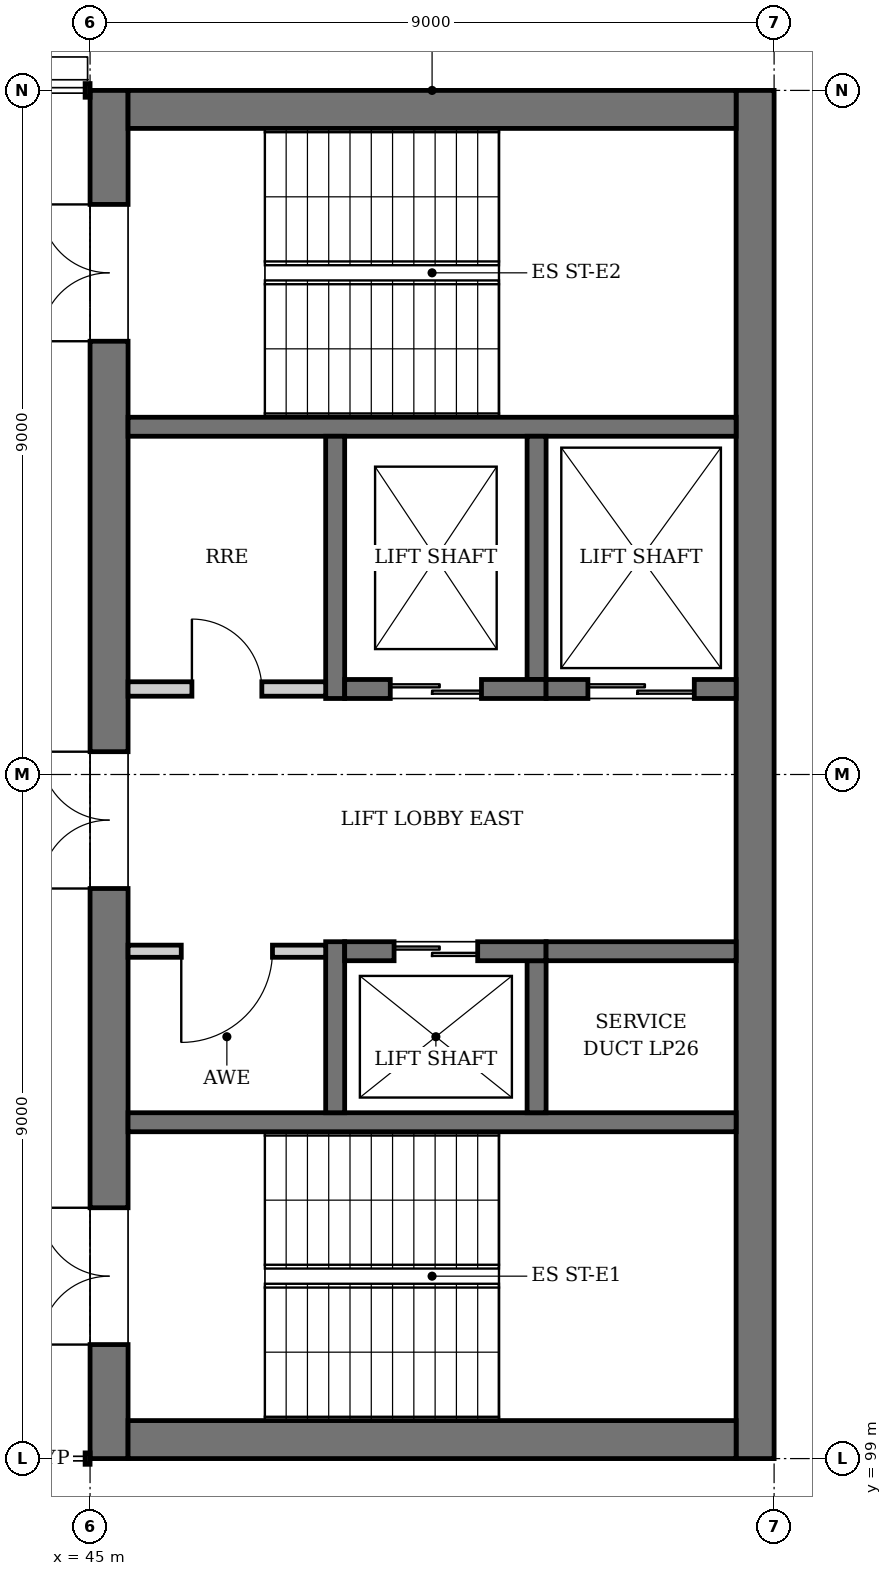
"""IFC4 building model, lengths in metres.
Left out: names, types, materials, properties, quantities, classifications, styles, units other than length and angle.
Written with IfcOpenShell. Run it as: python <this file> out.ifc"""

import sys

from ifc_helpers import new_model, si_unit, direction, frame, frame_2d, origin, place, context, subcontext, project, spatial, rectangle, extrude, element, fill, save


model = new_model("IFC4")
c1 = context("Model", 3, precision=1e-05, world=origin(), true_north=direction((0.0, 1.0)))
c2 = subcontext(c1, "Body", "Model", "MODEL_VIEW")
j1 = project(units=[si_unit("LENGTHUNIT", "METRE"), si_unit("PLANEANGLEUNIT", "RADIAN")], contexts=[c1])
p1 = place(None, origin())
s1 = spatial("IfcSite", under=j1, at=p1, CompositionType="ELEMENT")
p2 = place(p1, origin())
s2 = spatial("IfcBuilding", under=s1, at=p2, CompositionType="ELEMENT")
p3 = place(p2, frame((0.0, 0.0, 55.2)))
s3 = spatial("IfcBuildingStorey", under=s2, at=p3, CompositionType="ELEMENT", Elevation=55.2)
p4 = place(p3, frame((45.25, 99.0, 0.0), z_axis=(0.0, 0.0, 1.0), x_axis=(0.0, 1.0, 0.0)))
e1 = element("IfcWall", 1, at=p4, inside=s3, PredefinedType="SHEAR", context=c2, shape_type="SweptSolid", body=[
    extrude(rectangle(XDim=18.0, YDim=0.5, at=frame_2d((9.0, 0.0))), origin(), (0.0, 0.0, 1.0), 4.0),
])
p5 = place(p4, frame((1.5, 0.0, 0.0)))
e2 = element("IfcOpeningElement", 2, at=p5, cuts=e1, PredefinedType="OPENING", context=c2, shape_type="SweptSolid", body=[
    extrude(rectangle(XDim=1.8, YDim=2.1, at=frame_2d((0.9, 1.05))), frame((0.0, 0.26, 0.0), z_axis=(0.0, -1.0, 0.0), x_axis=(1.0, 0.0, 0.0)), (0.0, 0.0, 1.0), 0.52),
])
p6 = place(p4, frame((14.7, 0.0, 0.0)))
e3 = element("IfcOpeningElement", 3, at=p6, cuts=e1, PredefinedType="OPENING", context=c2, shape_type="SweptSolid", body=[
    extrude(rectangle(XDim=1.8, YDim=2.1, at=frame_2d((0.9, 1.05))), frame((0.0, 0.26, 0.0), z_axis=(0.0, -1.0, 0.0), x_axis=(1.0, 0.0, 0.0)), (0.0, 0.0, 1.0), 0.52),
])
p7 = place(p4, frame((7.5, 0.0, 0.0)))
e4 = element("IfcOpeningElement", 4, at=p7, cuts=e1, PredefinedType="OPENING", context=c2, shape_type="SweptSolid", body=[
    extrude(rectangle(XDim=1.8, YDim=2.1, at=frame_2d((0.9, 1.05))), frame((0.0, 0.26, 0.0), z_axis=(0.0, -1.0, 0.0), x_axis=(1.0, 0.0, 0.0)), (0.0, 0.0, 1.0), 0.52),
])
p8 = place(p3, frame((53.75, 99.0, 0.0), z_axis=(0.0, 0.0, 1.0), x_axis=(0.0, 1.0, 0.0)))
e5 = element("IfcWall", 5, at=p8, inside=s3, PredefinedType="SHEAR", context=c2, shape_type="SweptSolid", body=[
    extrude(rectangle(XDim=18.0, YDim=0.5, at=frame_2d((9.0, 0.0))), origin(), (0.0, 0.0, 1.0), 4.0),
])
for number, where, z_axis, x_axis in (
    (6, (45.5, 99.25, 0.0), (0.0, 0.0, 1.0), (1.0, 0.0, 0.0)),
    (7, (45.5, 116.75, 0.0), (0.0, 0.0, 1.0), (1.0, 0.0, 0.0)),
):
    element("IfcWall", number, at=place(p3, frame(where, z_axis=z_axis, x_axis=x_axis)), inside=s3, PredefinedType="SHEAR", context=c2, shape_type="SweptSolid", body=[
        extrude(rectangle(XDim=8.0, YDim=0.5, at=frame_2d((4.0, 0.0))), origin(), (0.0, 0.0, 1.0), 4.0),
    ])
for number, where, z_axis, x_axis in (
    (8, (45.5, 103.425, 0.0), (0.0, 0.0, 1.0), (1.0, 0.0, 0.0)),
    (9, (45.5, 112.575, 0.0), (0.0, 0.0, 1.0), (1.0, 0.0, 0.0)),
):
    element("IfcWall", number, at=place(p3, frame(where, z_axis=z_axis, x_axis=x_axis)), inside=s3, PredefinedType="SOLIDWALL", context=c2, shape_type="SweptSolid", body=[
        extrude(rectangle(XDim=8.0, YDim=0.25, at=frame_2d((4.0, 0.0))), origin(), (0.0, 0.0, 1.0), 3.75),
    ])
p9 = place(p3, frame((48.225, 103.55, 0.0), z_axis=(0.0, 0.0, 1.0), x_axis=(0.0, 1.0, 0.0)))
e10 = element("IfcWall", 10, at=p9, inside=s3, PredefinedType="SOLIDWALL", context=c2, shape_type="SweptSolid", body=[
    extrude(rectangle(XDim=2.25, YDim=0.25, at=frame_2d((1.125, 0.0))), origin(), (0.0, 0.0, 1.0), 4.0),
])
p10 = place(p3, frame((50.875, 103.55, 0.0), z_axis=(0.0, 0.0, 1.0), x_axis=(0.0, 1.0, 0.0)))
e11 = element("IfcWall", 11, at=p10, inside=s3, PredefinedType="SOLIDWALL", context=c2, shape_type="SweptSolid", body=[
    extrude(rectangle(XDim=2.0, YDim=0.25, at=frame_2d((1.0, 0.0))), origin(), (0.0, 0.0, 1.0), 4.0),
])
p11 = place(p3, frame((48.35, 105.675, 0.0), z_axis=(0.0, 0.0, 1.0), x_axis=(1.0, 0.0, 0.0)))
e12 = element("IfcWall", 12, at=p11, inside=s3, PredefinedType="SOLIDWALL", context=c2, shape_type="SweptSolid", body=[
    extrude(rectangle(XDim=2.65, YDim=0.25, at=frame_2d((1.325, 0.0))), origin(), (0.0, 0.0, 1.0), 4.0),
])
p12 = place(p11, frame((0.65, 0.0, 0.0)))
e13 = element("IfcOpeningElement", 13, at=p12, cuts=e12, PredefinedType="OPENING", context=c2, shape_type="SweptSolid", body=[
    extrude(rectangle(XDim=1.1, YDim=2.1, at=frame_2d((0.55, 1.05))), frame((0.0, 0.135, 0.0), z_axis=(0.0, -1.0, 0.0), x_axis=(1.0, 0.0, 0.0)), (0.0, 0.0, 1.0), 0.27),
])
p13 = place(p3, frame((51.0, 105.675, 0.0), z_axis=(0.0, 0.0, 1.0), x_axis=(1.0, 0.0, 0.0)))
e14 = element("IfcWall", 14, at=p13, inside=s3, PredefinedType="SOLIDWALL", context=c2, shape_type="SweptSolid", body=[
    extrude(rectangle(XDim=2.5, YDim=0.25, at=frame_2d((1.25, 0.0))), origin(), (0.0, 0.0, 1.0), 4.0),
])
p14 = place(p3, frame((48.225, 109.0, 0.0), z_axis=(0.0, 0.0, 1.0), x_axis=(0.0, 1.0, 0.0)))
e15 = element("IfcWall", 15, at=p14, inside=s3, PredefinedType="SOLIDWALL", context=c2, shape_type="SweptSolid", body=[
    extrude(rectangle(XDim=3.45, YDim=0.25, at=frame_2d((1.725, 0.0))), origin(), (0.0, 0.0, 1.0), 4.0),
])
p15 = place(p3, frame((50.875, 109.25, 0.0), z_axis=(0.0, 0.0, 1.0), x_axis=(0.0, 1.0, 0.0)))
e16 = element("IfcWall", 16, at=p15, inside=s3, PredefinedType="SOLIDWALL", context=c2, shape_type="SweptSolid", body=[
    extrude(rectangle(XDim=3.2, YDim=0.25, at=frame_2d((1.6, 0.0))), origin(), (0.0, 0.0, 1.0), 4.0),
])
p16 = place(p3, frame((48.35, 109.125, 0.0), z_axis=(0.0, 0.0, 1.0), x_axis=(1.0, 0.0, 0.0)))
e17 = element("IfcWall", 17, at=p16, inside=s3, PredefinedType="SOLIDWALL", context=c2, shape_type="SweptSolid", body=[
    extrude(rectangle(XDim=2.65, YDim=0.25, at=frame_2d((1.325, 0.0))), origin(), (0.0, 0.0, 1.0), 4.0),
])
p17 = place(p16, frame((0.6, 0.0, 0.0)))
e18 = element("IfcOpeningElement", 18, at=p17, cuts=e17, PredefinedType="OPENING", context=c2, shape_type="SweptSolid", body=[
    extrude(rectangle(XDim=1.2, YDim=2.1, at=frame_2d((0.6, 1.05))), frame((0.0, 0.135, 0.0), z_axis=(0.0, -1.0, 0.0), x_axis=(1.0, 0.0, 0.0)), (0.0, 0.0, 1.0), 0.27),
])
p18 = place(p3, frame((51.0, 109.125, 0.0), z_axis=(0.0, 0.0, 1.0), x_axis=(1.0, 0.0, 0.0)))
e19 = element("IfcWall", 19, at=p18, inside=s3, PredefinedType="SOLIDWALL", context=c2, shape_type="SweptSolid", body=[
    extrude(rectangle(XDim=2.5, YDim=0.25, at=frame_2d((1.25, 0.0))), origin(), (0.0, 0.0, 1.0), 4.0),
])
p19 = place(p18, frame((0.55, 0.0, 0.0)))
e20 = element("IfcOpeningElement", 20, at=p19, cuts=e19, PredefinedType="OPENING", context=c2, shape_type="SweptSolid", body=[
    extrude(rectangle(XDim=1.4, YDim=2.4, at=frame_2d((0.7, 1.2))), frame((0.0, 0.135, 0.0), z_axis=(0.0, -1.0, 0.0), x_axis=(1.0, 0.0, 0.0)), (0.0, 0.0, 1.0), 0.27),
])
p20 = place(p3, frame((45.5, 105.675, 0.0), z_axis=(0.0, 0.0, 1.0), x_axis=(1.0, 0.0, 0.0)))
e21 = element("IfcWall", 21, at=p20, inside=s3, PredefinedType="PARTITIONING", context=c2, shape_type="SweptSolid", body=[
    extrude(rectangle(XDim=2.6, YDim=0.16, at=frame_2d((1.3, 0.0))), origin(), (0.0, 0.0, 1.0), 3.75),
])
p21 = place(p20, frame((0.7, 0.0, 0.0)))
e22 = element("IfcOpeningElement", 22, at=p21, cuts=e21, PredefinedType="OPENING", context=c2, shape_type="SweptSolid", body=[
    extrude(rectangle(XDim=1.2, YDim=2.1, at=frame_2d((0.6, 1.05))), frame((0.0, 0.09, 0.0), z_axis=(0.0, -1.0, 0.0), x_axis=(1.0, 0.0, 0.0)), (0.0, 0.0, 1.0), 0.18),
])
p22 = place(p3, frame((45.5, 109.125, 0.0), z_axis=(0.0, 0.0, 1.0), x_axis=(1.0, 0.0, 0.0)))
e23 = element("IfcWall", 23, at=p22, inside=s3, PredefinedType="PARTITIONING", context=c2, shape_type="SweptSolid", body=[
    extrude(rectangle(XDim=2.6, YDim=0.19, at=frame_2d((1.3, 0.0))), origin(), (0.0, 0.0, 1.0), 3.75),
])
p23 = place(p22, frame((0.84, 0.0, 0.0)))
e24 = element("IfcOpeningElement", 24, at=p23, cuts=e23, PredefinedType="OPENING", context=c2, shape_type="SweptSolid", body=[
    extrude(rectangle(XDim=0.92, YDim=2.1, at=frame_2d((0.46, 1.05))), frame((0.0, 0.105, 0.0), z_axis=(0.0, -1.0, 0.0), x_axis=(1.0, 0.0, 0.0)), (0.0, 0.0, 1.0), 0.21),
])
p24 = place(p12, origin())
e25 = element("IfcDoor", 25, at=p24, inside=s3, OperationType="DOUBLE_DOOR_SLIDING", PredefinedType="DOOR", context=c2, shape_type="SweptSolid", body=[
    extrude(rectangle(XDim=1.1, YDim=2.1, at=frame_2d((0.55, 1.05))), frame((0.0, 0.025, 0.0), z_axis=(0.0, -1.0, 0.0), x_axis=(1.0, 0.0, 0.0)), (0.0, 0.0, 1.0), 0.05),
])
fill(e13, e25)
p25 = place(p17, origin())
e26 = element("IfcDoor", 26, at=p25, inside=s3, OperationType="DOUBLE_DOOR_SLIDING", PredefinedType="DOOR", context=c2, shape_type="SweptSolid", body=[
    extrude(rectangle(XDim=1.2, YDim=2.1, at=frame_2d((0.6, 1.05))), frame((0.0, 0.025, 0.0), z_axis=(0.0, -1.0, 0.0), x_axis=(1.0, 0.0, 0.0)), (0.0, 0.0, 1.0), 0.05),
])
fill(e18, e26)
p26 = place(p19, origin())
e27 = element("IfcDoor", 27, at=p26, inside=s3, OperationType="DOUBLE_DOOR_SLIDING", PredefinedType="DOOR", context=c2, shape_type="SweptSolid", body=[
    extrude(rectangle(XDim=1.4, YDim=2.4, at=frame_2d((0.7, 1.2))), frame((0.0, 0.025, 0.0), z_axis=(0.0, -1.0, 0.0), x_axis=(1.0, 0.0, 0.0)), (0.0, 0.0, 1.0), 0.05),
])
fill(e20, e27)
p27 = place(p5, origin())
e28 = element("IfcDoor", 28, at=p27, inside=s3, OperationType="DOUBLE_DOOR_SINGLE_SWING", PredefinedType="DOOR", context=c2, shape_type="SweptSolid", body=[
    extrude(rectangle(XDim=1.8, YDim=2.1, at=frame_2d((0.9, 1.05))), frame((0.0, 0.025, 0.0), z_axis=(0.0, -1.0, 0.0), x_axis=(1.0, 0.0, 0.0)), (0.0, 0.0, 1.0), 0.05),
])
fill(e2, e28)
p28 = place(p6, origin())
e29 = element("IfcDoor", 29, at=p28, inside=s3, OperationType="DOUBLE_DOOR_SINGLE_SWING", PredefinedType="DOOR", context=c2, shape_type="SweptSolid", body=[
    extrude(rectangle(XDim=1.8, YDim=2.1, at=frame_2d((0.9, 1.05))), frame((0.0, 0.025, 0.0), z_axis=(0.0, -1.0, 0.0), x_axis=(1.0, 0.0, 0.0)), (0.0, 0.0, 1.0), 0.05),
])
fill(e3, e29)
p29 = place(p7, origin())
e30 = element("IfcDoor", 30, at=p29, inside=s3, OperationType="DOUBLE_DOOR_SINGLE_SWING", PredefinedType="DOOR", context=c2, shape_type="SweptSolid", body=[
    extrude(rectangle(XDim=1.8, YDim=2.1, at=frame_2d((0.9, 1.05))), frame((0.0, 0.025, 0.0), z_axis=(0.0, -1.0, 0.0), x_axis=(1.0, 0.0, 0.0)), (0.0, 0.0, 1.0), 0.05),
])
fill(e4, e30)
p30 = place(p21, frame((1.2, 0.0, 0.0), z_axis=(0.0, 0.0, 1.0), x_axis=(-1.0, 0.0, 0.0)))
e31 = element("IfcDoor", 31, at=p30, inside=s3, OperationType="SINGLE_SWING_RIGHT", PredefinedType="DOOR", context=c2, shape_type="SweptSolid", body=[
    extrude(rectangle(XDim=1.2, YDim=2.1, at=frame_2d((0.6, 1.05))), frame((0.0, 0.025, 0.0), z_axis=(0.0, -1.0, 0.0), x_axis=(1.0, 0.0, 0.0)), (0.0, 0.0, 1.0), 0.05),
])
fill(e22, e31)
p31 = place(p23, origin())
e32 = element("IfcDoor", 32, at=p31, inside=s3, OperationType="SINGLE_SWING_LEFT", PredefinedType="DOOR", context=c2, shape_type="SweptSolid", body=[
    extrude(rectangle(XDim=0.92, YDim=2.1, at=frame_2d((0.46, 1.05))), frame((0.0, 0.025, 0.0), z_axis=(0.0, -1.0, 0.0), x_axis=(1.0, 0.0, 0.0)), (0.0, 0.0, 1.0), 0.05),
])
fill(e24, e32)
save(model, sys.argv[1])
